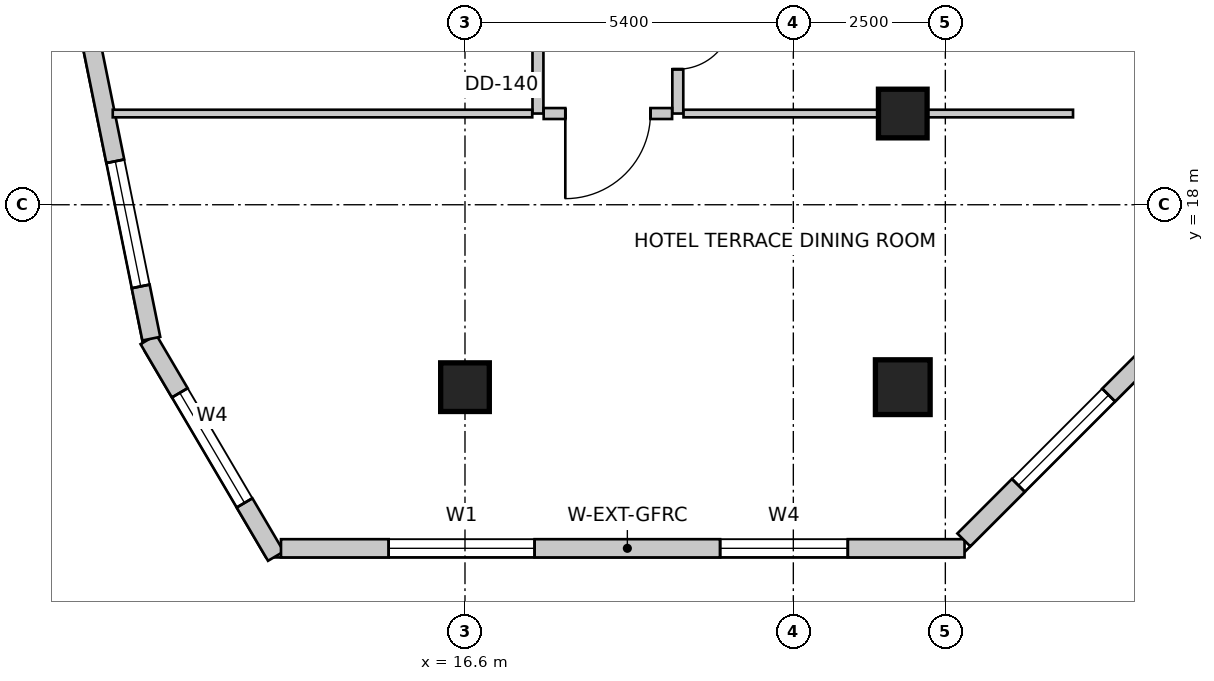
"""IFC4 building model, lengths in metres.
Left out: names, types, materials, properties, quantities, classifications, styles, units other than length and angle.
Written with IfcOpenShell. Run it as: python <this file> out.ifc"""

import sys

from ifc_helpers import new_model, si_unit, direction, frame, frame_2d, origin, origin_2d, place, context, subcontext, project, spatial, rectangle, extrude, source, transform, mapped, element, fill, save


model = new_model("IFC4")
c1 = context("Model", 3, precision=1e-05, world=origin(), true_north=direction((0.0, 1.0)))
c2 = subcontext(c1, "Body", "Model", "MODEL_VIEW")
j1 = project(units=[si_unit("LENGTHUNIT", "METRE"), si_unit("PLANEANGLEUNIT", "RADIAN")], contexts=[c1])
p1 = place(None, origin())
s1 = spatial("IfcSite", under=j1, at=p1, CompositionType="ELEMENT")
p2 = place(p1, origin())
s2 = spatial("IfcBuilding", under=s1, at=p2, CompositionType="ELEMENT")
p3 = place(p2, frame((0.0, 0.0, 146.6)))
s3 = spatial("IfcBuildingStorey", under=s2, at=p3, CompositionType="ELEMENT", Elevation=146.6)
m1 = source(origin(), c2, "Body", "SweptSolid", [
    extrude(rectangle(XDim=0.8, YDim=0.8, at=origin_2d()), origin(), (0.0, 0.0, 1.0), 3.6),
])
p4 = place(p3, frame((23.8, 19.5, 0.0), z_axis=(0.0, 0.0, 1.0), x_axis=(1.0, 0.0, 0.0)))
e1 = element("IfcColumn", 1, at=p4, inside=s3, PredefinedType="COLUMN", context=c2, shape_type="MappedRepresentation", body=[
    mapped(m1, transform((0.0, 0.0, 0.0), scale=1.0)),
])
m2 = source(origin(), c2, "Body", "SweptSolid", [
    extrude(rectangle(XDim=0.9, YDim=0.9, at=origin_2d()), origin(), (0.0, 0.0, 1.0), 3.6),
])
p5 = place(p3, frame((23.8, 15.0, 0.0), z_axis=(0.0, 0.0, 1.0), x_axis=(1.0, 0.0, 0.0)))
e2 = element("IfcColumn", 2, at=p5, inside=s3, PredefinedType="COLUMN", context=c2, shape_type="MappedRepresentation", body=[
    mapped(m2, transform((0.0, 0.0, 0.0), scale=1.0)),
])
p6 = place(p3, frame((16.6, 15.0, 0.0), z_axis=(0.0, 0.0, 1.0), x_axis=(1.0, 0.0, 0.0)))
e3 = element("IfcColumn", 3, at=p6, inside=s3, PredefinedType="COLUMN", context=c2, shape_type="MappedRepresentation", body=[
    mapped(m1, transform((0.0, 0.0, 0.0), scale=1.0)),
])
p7 = place(p3, frame((11.394, 15.784, 0.0), z_axis=(0.0, 0.0, 1.0), x_axis=(0.50698915279, -0.861952434275, 0.0)))
e4 = element("IfcWall", 4, at=p7, inside=s3, PredefinedType="SOLIDWALL", context=c2, shape_type="SweptSolid", body=[
    extrude(rectangle(XDim=4.134, YDim=0.3, at=frame_2d((2.067, 0.0))), origin(), (0.0, 0.0, 1.0), 3.35),
])
m3 = source(origin(), c2, "Body", "SweptSolid", [
    extrude(rectangle(XDim=2.1, YDim=2.0, at=frame_2d((1.05, 1.0))), frame((0.0, 0.16, 0.0), z_axis=(0.0, -1.0, 0.0), x_axis=(1.0, 0.0, 0.0)), (0.0, 0.0, 1.0), 0.32),
])
p8 = place(p7, frame((1.017, 0.0, 0.85)))
e5 = element("IfcOpeningElement", 5, at=p8, cuts=e4, PredefinedType="OPENING", context=c2, shape_type="MappedRepresentation", body=[
    mapped(m3, transform((0.0, 0.0, 0.0), scale=1.0)),
])
p9 = place(p3, frame((13.574, 12.35, 0.0), z_axis=(0.0, 0.0, 1.0), x_axis=(1.0, 0.0, 0.0)))
e6 = element("IfcWall", 6, at=p9, inside=s3, PredefinedType="SOLIDWALL", context=c2, shape_type="SweptSolid", body=[
    extrude(rectangle(XDim=11.242, YDim=0.3, at=frame_2d((5.621, 0.0))), origin(), (0.0, 0.0, 1.0), 3.35),
])
m4 = source(origin(), c2, "Body", "SweptSolid", [
    extrude(rectangle(XDim=2.4, YDim=2.2, at=frame_2d((1.2, 1.1))), frame((0.0, 0.16, 0.0), z_axis=(0.0, -1.0, 0.0), x_axis=(1.0, 0.0, 0.0)), (0.0, 0.0, 1.0), 0.32),
])
p10 = place(p9, frame((1.771, 0.0, 0.85)))
e7 = element("IfcOpeningElement", 7, at=p10, cuts=e6, PredefinedType="OPENING", context=c2, shape_type="MappedRepresentation", body=[
    mapped(m4, transform((0.0, 0.0, 0.0), scale=1.0)),
])
p11 = place(p9, frame((7.222, 0.0, 0.85)))
e8 = element("IfcOpeningElement", 8, at=p11, cuts=e6, PredefinedType="OPENING", context=c2, shape_type="MappedRepresentation", body=[
    mapped(m3, transform((0.0, 0.0, 0.0), scale=1.0)),
])
p12 = place(p3, frame((24.804, 12.488, 0.0), z_axis=(0.0, 0.0, 1.0), x_axis=(0.70708046583, 0.707133095564, 0.0)))
e9 = element("IfcWall", 9, at=p12, inside=s3, PredefinedType="SOLIDWALL", context=c2, shape_type="SweptSolid", body=[
    extrude(rectangle(XDim=4.639, YDim=0.3, at=frame_2d((2.319, 0.0))), origin(), (0.0, 0.0, 1.0), 3.35),
])
p13 = place(p12, frame((1.269, 0.0, 0.85)))
e10 = element("IfcOpeningElement", 10, at=p13, cuts=e9, PredefinedType="OPENING", context=c2, shape_type="MappedRepresentation", body=[
    mapped(m3, transform((0.0, 0.0, 0.0), scale=1.0)),
])
p14 = place(p3, frame((8.187, 31.834, 0.0), z_axis=(0.0, 0.0, 1.0), x_axis=(0.198869838988, -0.980025911464, 0.0)))
e11 = element("IfcWall", 11, at=p14, inside=s3, PredefinedType="SOLIDWALL", context=c2, shape_type="SweptSolid", body=[
    extrude(rectangle(XDim=16.363, YDim=0.3, at=frame_2d((8.182, 0.0))), origin(), (0.0, 0.0, 1.0), 3.35),
])
m5 = source(origin(), c2, "Body", "SweptSolid", [
    extrude(rectangle(XDim=1.2, YDim=1.6, at=frame_2d((0.6, 0.8))), frame((0.0, 0.16, 0.0), z_axis=(0.0, -1.0, 0.0), x_axis=(1.0, 0.0, 0.0)), (0.0, 0.0, 1.0), 0.32),
])
p15 = place(p14, frame((1.131, 0.0, 0.85)))
e12 = element("IfcOpeningElement", 12, at=p15, cuts=e11, PredefinedType="OPENING", context=c2, shape_type="MappedRepresentation", body=[
    mapped(m5, transform((0.0, 0.0, 0.0), scale=1.0)),
])
p16 = place(p14, frame((4.345, 0.0, 0.85)))
e13 = element("IfcOpeningElement", 13, at=p16, cuts=e11, PredefinedType="OPENING", context=c2, shape_type="MappedRepresentation", body=[
    mapped(m3, transform((0.0, 0.0, 0.0), scale=1.0)),
])
p17 = place(p14, frame((8.857, 0.0, 0.85)))
e14 = element("IfcOpeningElement", 14, at=p17, cuts=e11, PredefinedType="OPENING", context=c2, shape_type="MappedRepresentation", body=[
    mapped(m4, transform((0.0, 0.0, 0.0), scale=1.0)),
])
p18 = place(p14, frame((13.386, 0.0, 0.85)))
e15 = element("IfcOpeningElement", 15, at=p18, cuts=e11, PredefinedType="OPENING", context=c2, shape_type="MappedRepresentation", body=[
    mapped(m3, transform((0.0, 0.0, 0.0), scale=1.0)),
])
p19 = place(p3, frame((17.8, 19.5, 0.0), z_axis=(0.0, 0.0, 1.0), x_axis=(0.0, 1.0, 0.0)))
e16 = element("IfcWall", 16, at=p19, inside=s3, PredefinedType="PARTITIONING", context=c2, shape_type="SweptSolid", body=[
    extrude(rectangle(XDim=11.656, YDim=0.18, at=frame_2d((5.828, 0.0))), origin(), (0.0, 0.0, 1.0), 2.788),
])
m6 = source(origin(), c2, "Body", "SweptSolid", [
    extrude(rectangle(XDim=0.9, YDim=2.15, at=frame_2d((0.45, 1.075))), frame((0.0, 0.1, 0.0), z_axis=(0.0, -1.0, 0.0), x_axis=(1.0, 0.0, 0.0)), (0.0, 0.0, 1.0), 0.2),
])
p20 = place(p19, frame((5.378, 0.0, 0.0)))
e17 = element("IfcOpeningElement", 17, at=p20, cuts=e16, PredefinedType="OPENING", context=c2, shape_type="MappedRepresentation", body=[
    mapped(m6, transform((0.0, 0.0, 0.0), scale=1.0)),
])
p21 = place(p3, frame((20.1, 21.858, 0.0), z_axis=(0.0, 0.0, 1.0), x_axis=(0.0, -1.0, 0.0)))
e18 = element("IfcWall", 18, at=p21, inside=s3, PredefinedType="PARTITIONING", context=c2, shape_type="SweptSolid", body=[
    extrude(rectangle(XDim=2.358, YDim=0.18, at=frame_2d((1.179, 0.0))), origin(), (0.0, 0.0, 1.0), 2.788),
])
p22 = place(p21, frame((0.729, 0.0, 0.0)))
e19 = element("IfcOpeningElement", 19, at=p22, cuts=e18, PredefinedType="OPENING", context=c2, shape_type="MappedRepresentation", body=[
    mapped(m6, transform((0.0, 0.0, 0.0), scale=1.0)),
])
p23 = place(p3, frame((20.006, 19.5, 0.0), z_axis=(0.0, 0.0, 1.0), x_axis=(-1.0, 0.0, 0.0)))
e20 = element("IfcWall", 20, at=p23, inside=s3, PredefinedType="PARTITIONING", context=c2, shape_type="SweptSolid", body=[
    extrude(rectangle(XDim=2.112, YDim=0.18, at=frame_2d((1.056, 0.0))), origin(), (0.0, 0.0, 1.0), 3.35),
])
m7 = source(origin(), c2, "Body", "SweptSolid", [
    extrude(rectangle(XDim=1.4, YDim=2.15, at=frame_2d((0.7, 1.075))), frame((0.0, 0.1, 0.0), z_axis=(0.0, -1.0, 0.0), x_axis=(1.0, 0.0, 0.0)), (0.0, 0.0, 1.0), 0.2),
])
p24 = place(p23, frame((0.356, 0.0, 0.0)))
e21 = element("IfcOpeningElement", 21, at=p24, cuts=e20, PredefinedType="OPENING", context=c2, shape_type="MappedRepresentation", body=[
    mapped(m7, transform((0.0, 0.0, 0.0), scale=1.0)),
])
p25 = place(p3, frame((17.706, 19.5, 0.0), z_axis=(0.0, 0.0, 1.0), x_axis=(-1.0, 0.0, 0.0)))
e22 = element("IfcWall", 22, at=p25, inside=s3, PredefinedType="PARTITIONING", context=c2, shape_type="SweptSolid", body=[
    extrude(rectangle(XDim=6.899, YDim=0.125, at=frame_2d((3.45, 0.0))), origin(), (0.0, 0.0, 1.0), 3.35),
])
p26 = place(p3, frame((26.6, 19.5, 0.0), z_axis=(0.0, 0.0, 1.0), x_axis=(-1.0, 0.0, 0.0)))
e23 = element("IfcWall", 23, at=p26, inside=s3, PredefinedType="PARTITIONING", context=c2, shape_type="SweptSolid", body=[
    extrude(rectangle(XDim=6.406, YDim=0.125, at=frame_2d((3.203, 0.0))), origin(), (0.0, 0.0, 1.0), 2.492),
])
m8 = source(origin(), c2, "Body", "SweptSolid", [
    extrude(rectangle(XDim=2.1, YDim=2.0, at=frame_2d((1.05, 1.0))), frame((0.0, -0.015, 0.0), z_axis=(0.0, -1.0, 0.0), x_axis=(1.0, 0.0, 0.0)), (0.0, 0.0, 1.0), 0.06),
])
p27 = place(p8, origin())
e24 = element("IfcWindow", 24, at=p27, inside=s3, PartitioningType="SINGLE_PANEL", PredefinedType="WINDOW", context=c2, shape_type="MappedRepresentation", body=[
    mapped(m8, transform((0.0, 0.0, 0.0), scale=1.0)),
])
fill(e5, e24)
m9 = source(origin(), c2, "Body", "SweptSolid", [
    extrude(rectangle(XDim=2.4, YDim=2.2, at=frame_2d((1.2, 1.1))), frame((0.0, -0.015, 0.0), z_axis=(0.0, -1.0, 0.0), x_axis=(1.0, 0.0, 0.0)), (0.0, 0.0, 1.0), 0.06),
])
p28 = place(p10, origin())
e25 = element("IfcWindow", 25, at=p28, inside=s3, PartitioningType="SINGLE_PANEL", PredefinedType="WINDOW", context=c2, shape_type="MappedRepresentation", body=[
    mapped(m9, transform((0.0, 0.0, 0.0), scale=1.0)),
])
fill(e7, e25)
p29 = place(p11, origin())
e26 = element("IfcWindow", 26, at=p29, inside=s3, PartitioningType="SINGLE_PANEL", PredefinedType="WINDOW", context=c2, shape_type="MappedRepresentation", body=[
    mapped(m8, transform((0.0, 0.0, 0.0), scale=1.0)),
])
fill(e8, e26)
p30 = place(p13, origin())
e27 = element("IfcWindow", 27, at=p30, inside=s3, PartitioningType="SINGLE_PANEL", PredefinedType="WINDOW", context=c2, shape_type="MappedRepresentation", body=[
    mapped(m8, transform((0.0, 0.0, 0.0), scale=1.0)),
])
fill(e10, e27)
p31 = place(p18, origin())
e28 = element("IfcWindow", 28, at=p31, inside=s3, PartitioningType="SINGLE_PANEL", PredefinedType="WINDOW", context=c2, shape_type="MappedRepresentation", body=[
    mapped(m8, transform((0.0, 0.0, 0.0), scale=1.0)),
])
fill(e15, e28)
m10 = source(origin(), c2, "Body", "SweptSolid", [
    extrude(rectangle(XDim=0.9, YDim=2.15, at=frame_2d((0.45, 1.075))), frame((0.0, 0.025, 0.0), z_axis=(0.0, -1.0, 0.0), x_axis=(1.0, 0.0, 0.0)), (0.0, 0.0, 1.0), 0.05),
])
p32 = place(p22, origin())
e29 = element("IfcDoor", 29, at=p32, inside=s3, OperationType="SINGLE_SWING_LEFT", PredefinedType="DOOR", context=c2, shape_type="MappedRepresentation", body=[
    mapped(m10, transform((0.0, 0.0, 0.0), scale=1.0)),
])
fill(e19, e29)
m11 = source(origin(), c2, "Body", "SweptSolid", [
    extrude(rectangle(XDim=1.4, YDim=2.15, at=frame_2d((0.7, 1.075))), frame((0.0, 0.025, 0.0), z_axis=(0.0, -1.0, 0.0), x_axis=(1.0, 0.0, 0.0)), (0.0, 0.0, 1.0), 0.05),
])
p33 = place(p24, origin())
e30 = element("IfcDoor", 30, at=p33, inside=s3, OperationType="SINGLE_SWING_RIGHT", PredefinedType="DOOR", context=c2, shape_type="MappedRepresentation", body=[
    mapped(m11, transform((0.0, 0.0, 0.0), scale=1.0)),
])
fill(e21, e30)
save(model, sys.argv[1])
